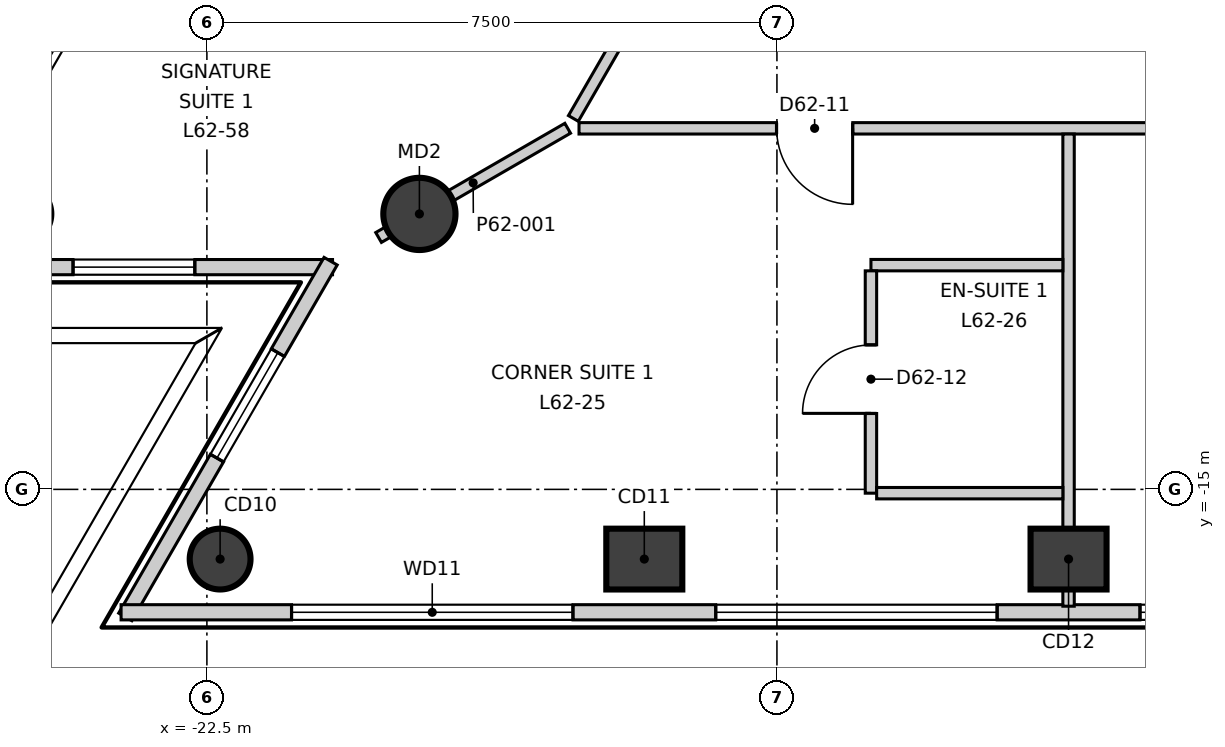
"""IFC4 building model, lengths in metres.
Left out: names, types, materials, properties, quantities, classifications, styles, units other than length and angle.
Written with IfcOpenShell. Run it as: python <this file> out.ifc"""

import sys

from ifc_helpers import new_model, si_unit, direction, frame, frame_2d, origin, origin_2d, place, context, subcontext, project, spatial, rectangle, circle, extrude, element, fill, save


model = new_model("IFC4")
c1 = context("Model", 3, precision=1e-05, world=origin(), true_north=direction((0.0, 1.0)))
c2 = subcontext(c1, "Body", "Model", "MODEL_VIEW")
j1 = project(units=[si_unit("LENGTHUNIT", "METRE"), si_unit("PLANEANGLEUNIT", "RADIAN")], contexts=[c1])
p1 = place(None, origin())
s1 = spatial("IfcSite", under=j1, at=p1, CompositionType="ELEMENT")
p2 = place(p1, origin())
s2 = spatial("IfcBuilding", under=s1, at=p2, CompositionType="ELEMENT")
p3 = place(p2, frame((0.0, 0.0, 268.3)))
s3 = spatial("IfcBuildingStorey", under=s2, at=p3, CompositionType="ELEMENT", Elevation=268.3)
p4 = place(p3, frame((-22.326, -15.917, -0.3), z_axis=(0.0, 0.0, 1.0), x_axis=(1.0, 0.0, 0.0)))
e1 = element("IfcColumn", 1, at=p4, inside=s3, PredefinedType="COLUMN", context=c2, shape_type="SweptSolid", body=[
    extrude(circle(Radius=0.4, at=origin_2d()), origin(), (0.0, 0.0, 1.0), 3.6),
])
for number, where, z_axis, x_axis in (
    (2, (-16.745, -15.917, -0.3), (0.0, 0.0, 1.0), (1.0, 0.0, 0.0)),
    (3, (-11.163, -15.917, -0.3), (0.0, 0.0, 1.0), (1.0, 0.0, 0.0)),
):
    element("IfcColumn", number, at=place(p3, frame(where, z_axis=z_axis, x_axis=x_axis)), inside=s3, PredefinedType="COLUMN", context=c2, shape_type="SweptSolid", body=[
        extrude(rectangle(XDim=1.0, YDim=0.8, at=origin_2d()), origin(), (0.0, 0.0, 1.0), 3.6),
    ])
p5 = place(p3, frame((-19.704, -11.376, -0.3), z_axis=(0.0, 0.0, 1.0), x_axis=(1.0, 0.0, 0.0)))
e4 = element("IfcColumn", 4, at=p5, inside=s3, PredefinedType="COLUMN", context=c2, shape_type="SweptSolid", body=[
    extrude(circle(Radius=0.475, at=origin_2d()), origin(), (0.0, 0.0, 1.0), 3.6),
])
p6 = place(p3, frame((-2.577, 28.771, 0.0), z_axis=(0.0, 0.0, 1.0), x_axis=(-0.49999909388, -0.866025926932, 0.0)))
e5 = element("IfcWall", 5, at=p6, inside=s3, PredefinedType="ELEMENTEDWALL", context=c2, shape_type="SweptSolid", body=[
    extrude(rectangle(XDim=47.236, YDim=0.2, at=frame_2d((23.618, 0.0))), origin(), (0.0, 0.0, 1.0), 3.3),
])
p7 = place(p6, frame((2.243, 0.0, 0.9)))
e6 = element("IfcOpeningElement", 6, at=p7, cuts=e5, PredefinedType="OPENING", context=c2, shape_type="SweptSolid", body=[
    extrude(rectangle(XDim=3.7, YDim=2.2, at=frame_2d((1.85, 1.1))), frame((0.0, 0.11, 0.0), z_axis=(0.0, -1.0, 0.0), x_axis=(1.0, 0.0, 0.0)), (0.0, 0.0, 1.0), 0.22),
])
p8 = place(p6, frame((7.824, 0.0, 0.9)))
e7 = element("IfcOpeningElement", 7, at=p8, cuts=e5, PredefinedType="OPENING", context=c2, shape_type="SweptSolid", body=[
    extrude(rectangle(XDim=3.7, YDim=2.2, at=frame_2d((1.85, 1.1))), frame((0.0, 0.11, 0.0), z_axis=(0.0, -1.0, 0.0), x_axis=(1.0, 0.0, 0.0)), (0.0, 0.0, 1.0), 0.22),
])
p9 = place(p6, frame((13.406, 0.0, 0.9)))
e8 = element("IfcOpeningElement", 8, at=p9, cuts=e5, PredefinedType="OPENING", context=c2, shape_type="SweptSolid", body=[
    extrude(rectangle(XDim=3.7, YDim=2.2, at=frame_2d((1.85, 1.1))), frame((0.0, 0.11, 0.0), z_axis=(0.0, -1.0, 0.0), x_axis=(1.0, 0.0, 0.0)), (0.0, 0.0, 1.0), 0.22),
])
p10 = place(p6, frame((18.987, 0.0, 0.9)))
e9 = element("IfcOpeningElement", 9, at=p10, cuts=e5, PredefinedType="OPENING", context=c2, shape_type="SweptSolid", body=[
    extrude(rectangle(XDim=3.7, YDim=2.2, at=frame_2d((1.85, 1.1))), frame((0.0, 0.11, 0.0), z_axis=(0.0, -1.0, 0.0), x_axis=(1.0, 0.0, 0.0)), (0.0, 0.0, 1.0), 0.22),
])
p11 = place(p6, frame((24.569, 0.0, 0.9)))
e10 = element("IfcOpeningElement", 10, at=p11, cuts=e5, PredefinedType="OPENING", context=c2, shape_type="SweptSolid", body=[
    extrude(rectangle(XDim=3.7, YDim=2.2, at=frame_2d((1.85, 1.1))), frame((0.0, 0.11, 0.0), z_axis=(0.0, -1.0, 0.0), x_axis=(1.0, 0.0, 0.0)), (0.0, 0.0, 1.0), 0.22),
])
p12 = place(p6, frame((30.15, 0.0, 0.9)))
e11 = element("IfcOpeningElement", 11, at=p12, cuts=e5, PredefinedType="OPENING", context=c2, shape_type="SweptSolid", body=[
    extrude(rectangle(XDim=3.7, YDim=2.2, at=frame_2d((1.85, 1.1))), frame((0.0, 0.11, 0.0), z_axis=(0.0, -1.0, 0.0), x_axis=(1.0, 0.0, 0.0)), (0.0, 0.0, 1.0), 0.22),
])
p13 = place(p6, frame((35.731, 0.0, 0.9)))
e12 = element("IfcOpeningElement", 12, at=p13, cuts=e5, PredefinedType="OPENING", context=c2, shape_type="SweptSolid", body=[
    extrude(rectangle(XDim=3.7, YDim=2.2, at=frame_2d((1.85, 1.1))), frame((0.0, 0.11, 0.0), z_axis=(0.0, -1.0, 0.0), x_axis=(1.0, 0.0, 0.0)), (0.0, 0.0, 1.0), 0.22),
])
p14 = place(p6, frame((41.313, 0.0, 0.9)))
e13 = element("IfcOpeningElement", 13, at=p14, cuts=e5, PredefinedType="OPENING", context=c2, shape_type="SweptSolid", body=[
    extrude(rectangle(XDim=3.7, YDim=2.2, at=frame_2d((1.85, 1.1))), frame((0.0, 0.11, 0.0), z_axis=(0.0, -1.0, 0.0), x_axis=(1.0, 0.0, 0.0)), (0.0, 0.0, 1.0), 0.22),
])
p15 = place(p3, frame((-26.25, -12.076, 0.0), z_axis=(0.0, 0.0, 1.0), x_axis=(1.0, 0.0, 0.0)))
e14 = element("IfcWall", 14, at=p15, inside=s3, PredefinedType="ELEMENTEDWALL", context=c2, shape_type="SweptSolid", body=[
    extrude(rectangle(XDim=5.403, YDim=0.2, at=frame_2d((2.702, 0.0))), origin(), (0.0, 0.0, 1.0), 3.3),
])
p16 = place(p15, frame((1.99, 0.0, 0.9)))
e15 = element("IfcOpeningElement", 15, at=p16, cuts=e14, PredefinedType="OPENING", context=c2, shape_type="SweptSolid", body=[
    extrude(rectangle(XDim=1.6, YDim=2.2, at=frame_2d((0.8, 1.1))), frame((0.0, 0.11, 0.0), z_axis=(0.0, -1.0, 0.0), x_axis=(1.0, 0.0, 0.0)), (0.0, 0.0, 1.0), 0.22),
])
p17 = place(p3, frame((-20.872, -11.998, 0.0), z_axis=(0.0, 0.0, 1.0), x_axis=(-0.499992297805, -0.866029850603, 0.0)))
e16 = element("IfcWall", 16, at=p17, inside=s3, PredefinedType="ELEMENTEDWALL", context=c2, shape_type="SweptSolid", body=[
    extrude(rectangle(XDim=5.404, YDim=0.2, at=frame_2d((2.702, 0.0))), origin(), (0.0, 0.0, 1.0), 3.3),
])
p18 = place(p17, frame((1.39, 0.0, 0.9)))
e17 = element("IfcOpeningElement", 17, at=p18, cuts=e16, PredefinedType="OPENING", context=c2, shape_type="SweptSolid", body=[
    extrude(rectangle(XDim=1.6, YDim=2.2, at=frame_2d((0.8, 1.1))), frame((0.0, 0.11, 0.0), z_axis=(0.0, -1.0, 0.0), x_axis=(1.0, 0.0, 0.0)), (0.0, 0.0, 1.0), 0.22),
])
p19 = place(p3, frame((-23.629, -16.617, 0.0), z_axis=(0.0, 0.0, 1.0), x_axis=(1.0, 0.0, 0.0)))
e18 = element("IfcWall", 18, at=p19, inside=s3, PredefinedType="ELEMENTEDWALL", context=c2, shape_type="SweptSolid", body=[
    extrude(rectangle(XDim=47.238, YDim=0.2, at=frame_2d((23.619, 0.0))), origin(), (0.0, 0.0, 1.0), 3.3),
])
p20 = place(p19, frame((2.244, 0.0, 0.9)))
e19 = element("IfcOpeningElement", 19, at=p20, cuts=e18, PredefinedType="OPENING", context=c2, shape_type="SweptSolid", body=[
    extrude(rectangle(XDim=3.7, YDim=2.2, at=frame_2d((1.85, 1.1))), frame((0.0, 0.11, 0.0), z_axis=(0.0, -1.0, 0.0), x_axis=(1.0, 0.0, 0.0)), (0.0, 0.0, 1.0), 0.22),
])
p21 = place(p19, frame((7.825, 0.0, 0.9)))
e20 = element("IfcOpeningElement", 20, at=p21, cuts=e18, PredefinedType="OPENING", context=c2, shape_type="SweptSolid", body=[
    extrude(rectangle(XDim=3.7, YDim=2.2, at=frame_2d((1.85, 1.1))), frame((0.0, 0.11, 0.0), z_axis=(0.0, -1.0, 0.0), x_axis=(1.0, 0.0, 0.0)), (0.0, 0.0, 1.0), 0.22),
])
p22 = place(p19, frame((13.407, 0.0, 0.9)))
e21 = element("IfcOpeningElement", 21, at=p22, cuts=e18, PredefinedType="OPENING", context=c2, shape_type="SweptSolid", body=[
    extrude(rectangle(XDim=3.7, YDim=2.2, at=frame_2d((1.85, 1.1))), frame((0.0, 0.11, 0.0), z_axis=(0.0, -1.0, 0.0), x_axis=(1.0, 0.0, 0.0)), (0.0, 0.0, 1.0), 0.22),
])
p23 = place(p19, frame((18.988, 0.0, 0.9)))
e22 = element("IfcOpeningElement", 22, at=p23, cuts=e18, PredefinedType="OPENING", context=c2, shape_type="SweptSolid", body=[
    extrude(rectangle(XDim=3.7, YDim=2.2, at=frame_2d((1.85, 1.1))), frame((0.0, 0.11, 0.0), z_axis=(0.0, -1.0, 0.0), x_axis=(1.0, 0.0, 0.0)), (0.0, 0.0, 1.0), 0.22),
])
p24 = place(p19, frame((24.57, 0.0, 0.9)))
e23 = element("IfcOpeningElement", 23, at=p24, cuts=e18, PredefinedType="OPENING", context=c2, shape_type="SweptSolid", body=[
    extrude(rectangle(XDim=3.7, YDim=2.2, at=frame_2d((1.85, 1.1))), frame((0.0, 0.11, 0.0), z_axis=(0.0, -1.0, 0.0), x_axis=(1.0, 0.0, 0.0)), (0.0, 0.0, 1.0), 0.22),
])
p25 = place(p19, frame((30.151, 0.0, 0.9)))
e24 = element("IfcOpeningElement", 24, at=p25, cuts=e18, PredefinedType="OPENING", context=c2, shape_type="SweptSolid", body=[
    extrude(rectangle(XDim=3.7, YDim=2.2, at=frame_2d((1.85, 1.1))), frame((0.0, 0.11, 0.0), z_axis=(0.0, -1.0, 0.0), x_axis=(1.0, 0.0, 0.0)), (0.0, 0.0, 1.0), 0.22),
])
p26 = place(p19, frame((35.733, 0.0, 0.9)))
e25 = element("IfcOpeningElement", 25, at=p26, cuts=e18, PredefinedType="OPENING", context=c2, shape_type="SweptSolid", body=[
    extrude(rectangle(XDim=3.7, YDim=2.2, at=frame_2d((1.85, 1.1))), frame((0.0, 0.11, 0.0), z_axis=(0.0, -1.0, 0.0), x_axis=(1.0, 0.0, 0.0)), (0.0, 0.0, 1.0), 0.22),
])
p27 = place(p19, frame((41.314, 0.0, 0.9)))
e26 = element("IfcOpeningElement", 26, at=p27, cuts=e18, PredefinedType="OPENING", context=c2, shape_type="SweptSolid", body=[
    extrude(rectangle(XDim=3.7, YDim=2.2, at=frame_2d((1.85, 1.1))), frame((0.0, 0.11, 0.0), z_axis=(0.0, -1.0, 0.0), x_axis=(1.0, 0.0, 0.0)), (0.0, 0.0, 1.0), 0.22),
])
p28 = place(p3, frame((-20.241, -11.686, 0.0), z_axis=(0.0, 0.0, 1.0), x_axis=(0.86594358484, 0.5001416878, 0.0)))
e27 = element("IfcWall", 27, at=p28, inside=s3, PredefinedType="PARTITIONING", context=c2, shape_type="SweptSolid", body=[
    extrude(rectangle(XDim=2.873, YDim=0.15, at=frame_2d((1.437, 0.0))), origin(), (0.0, 0.0, 1.0), 2.8),
])
p29 = place(p3, frame((-17.678, -10.12, 0.0), z_axis=(0.0, 0.0, 1.0), x_axis=(0.49998824015, 0.86603219323, 0.0)))
e28 = element("IfcWall", 28, at=p29, inside=s3, PredefinedType="PARTITIONING", context=c2, shape_type="SweptSolid", body=[
    extrude(rectangle(XDim=35.357, YDim=0.15, at=frame_2d((17.678, 0.0))), origin(), (0.0, 0.0, 1.0), 3.3),
])
p30 = place(p29, frame((31.607, 0.0, 0.0)))
e29 = element("IfcOpeningElement", 29, at=p30, cuts=e28, PredefinedType="OPENING", context=c2, shape_type="SweptSolid", body=[
    extrude(rectangle(XDim=1.0, YDim=2.1, at=frame_2d((0.5, 1.05))), frame((0.0, 0.085, 0.0), z_axis=(0.0, -1.0, 0.0), x_axis=(1.0, 0.0, 0.0)), (0.0, 0.0, 1.0), 0.17),
])
p31 = place(p29, frame((19.416, 0.0, 0.0)))
e30 = element("IfcOpeningElement", 30, at=p31, cuts=e28, PredefinedType="OPENING", context=c2, shape_type="SweptSolid", body=[
    extrude(rectangle(XDim=1.0, YDim=2.1, at=frame_2d((0.5, 1.05))), frame((0.0, 0.085, 0.0), z_axis=(0.0, -1.0, 0.0), x_axis=(1.0, 0.0, 0.0)), (0.0, 0.0, 1.0), 0.17),
])
p32 = place(p29, frame((24.916, 0.0, 0.0)))
e31 = element("IfcOpeningElement", 31, at=p32, cuts=e28, PredefinedType="OPENING", context=c2, shape_type="SweptSolid", body=[
    extrude(rectangle(XDim=0.9, YDim=2.1, at=frame_2d((0.45, 1.05))), frame((0.0, 0.085, 0.0), z_axis=(0.0, -1.0, 0.0), x_axis=(1.0, 0.0, 0.0)), (0.0, 0.0, 1.0), 0.17),
])
p33 = place(p29, frame((22.816, 0.0, 0.0)))
e32 = element("IfcOpeningElement", 32, at=p33, cuts=e28, PredefinedType="OPENING", context=c2, shape_type="SweptSolid", body=[
    extrude(rectangle(XDim=0.9, YDim=2.1, at=frame_2d((0.45, 1.05))), frame((0.0, 0.085, 0.0), z_axis=(0.0, -1.0, 0.0), x_axis=(1.0, 0.0, 0.0)), (0.0, 0.0, 1.0), 0.17),
])
p34 = place(p29, frame((14.654, 0.0, 0.0)))
e33 = element("IfcOpeningElement", 33, at=p34, cuts=e28, PredefinedType="OPENING", context=c2, shape_type="SweptSolid", body=[
    extrude(rectangle(XDim=1.0, YDim=2.1, at=frame_2d((0.5, 1.05))), frame((0.0, 0.085, 0.0), z_axis=(0.0, -1.0, 0.0), x_axis=(1.0, 0.0, 0.0)), (0.0, 0.0, 1.0), 0.17),
])
p35 = place(p29, frame((7.672, 0.0, 0.0)))
e34 = element("IfcOpeningElement", 34, at=p35, cuts=e28, PredefinedType="OPENING", context=c2, shape_type="SweptSolid", body=[
    extrude(rectangle(XDim=1.0, YDim=2.1, at=frame_2d((0.5, 1.05))), frame((0.0, 0.085, 0.0), z_axis=(0.0, -1.0, 0.0), x_axis=(1.0, 0.0, 0.0)), (0.0, 0.0, 1.0), 0.17),
])
p36 = place(p29, frame((2.69, 0.0, 0.0)))
e35 = element("IfcOpeningElement", 35, at=p36, cuts=e28, PredefinedType="OPENING", context=c2, shape_type="SweptSolid", body=[
    extrude(rectangle(XDim=1.0, YDim=2.1, at=frame_2d((0.5, 1.05))), frame((0.0, 0.085, 0.0), z_axis=(0.0, -1.0, 0.0), x_axis=(1.0, 0.0, 0.0)), (0.0, 0.0, 1.0), 0.17),
])
p37 = place(p3, frame((-17.604, -10.25, 0.0), z_axis=(0.0, 0.0, 1.0), x_axis=(1.0, 0.0, 0.0)))
e36 = element("IfcWall", 36, at=p37, inside=s3, PredefinedType="PARTITIONING", context=c2, shape_type="SweptSolid", body=[
    extrude(rectangle(XDim=35.358, YDim=0.15, at=frame_2d((17.679, 0.0))), origin(), (0.0, 0.0, 1.0), 3.3),
])
p38 = place(p37, frame((2.6, 0.0, 0.0)))
e37 = element("IfcOpeningElement", 37, at=p38, cuts=e36, PredefinedType="OPENING", context=c2, shape_type="SweptSolid", body=[
    extrude(rectangle(XDim=1.0, YDim=2.1, at=frame_2d((0.5, 1.05))), frame((0.0, 0.085, 0.0), z_axis=(0.0, -1.0, 0.0), x_axis=(1.0, 0.0, 0.0)), (0.0, 0.0, 1.0), 0.17),
])
p39 = place(p37, frame((8.391, 0.0, 0.0)))
e38 = element("IfcOpeningElement", 38, at=p39, cuts=e36, PredefinedType="OPENING", context=c2, shape_type="SweptSolid", body=[
    extrude(rectangle(XDim=1.0, YDim=2.1, at=frame_2d((0.5, 1.05))), frame((0.0, 0.085, 0.0), z_axis=(0.0, -1.0, 0.0), x_axis=(1.0, 0.0, 0.0)), (0.0, 0.0, 1.0), 0.17),
])
p40 = place(p37, frame((20.473, 0.0, 0.0)))
e39 = element("IfcOpeningElement", 39, at=p40, cuts=e36, PredefinedType="OPENING", context=c2, shape_type="SweptSolid", body=[
    extrude(rectangle(XDim=1.0, YDim=2.1, at=frame_2d((0.5, 1.05))), frame((0.0, 0.085, 0.0), z_axis=(0.0, -1.0, 0.0), x_axis=(1.0, 0.0, 0.0)), (0.0, 0.0, 1.0), 0.17),
])
p41 = place(p37, frame((14.973, 0.0, 0.0)))
e40 = element("IfcOpeningElement", 40, at=p41, cuts=e36, PredefinedType="OPENING", context=c2, shape_type="SweptSolid", body=[
    extrude(rectangle(XDim=0.9, YDim=2.1, at=frame_2d((0.45, 1.05))), frame((0.0, 0.085, 0.0), z_axis=(0.0, -1.0, 0.0), x_axis=(1.0, 0.0, 0.0)), (0.0, 0.0, 1.0), 0.17),
])
p42 = place(p37, frame((17.173, 0.0, 0.0)))
e41 = element("IfcOpeningElement", 41, at=p42, cuts=e36, PredefinedType="OPENING", context=c2, shape_type="SweptSolid", body=[
    extrude(rectangle(XDim=0.9, YDim=2.1, at=frame_2d((0.45, 1.05))), frame((0.0, 0.085, 0.0), z_axis=(0.0, -1.0, 0.0), x_axis=(1.0, 0.0, 0.0)), (0.0, 0.0, 1.0), 0.17),
])
p43 = place(p37, frame((28.735, 0.0, 0.0)))
e42 = element("IfcOpeningElement", 42, at=p43, cuts=e36, PredefinedType="OPENING", context=c2, shape_type="SweptSolid", body=[
    extrude(rectangle(XDim=1.0, YDim=2.1, at=frame_2d((0.5, 1.05))), frame((0.0, 0.085, 0.0), z_axis=(0.0, -1.0, 0.0), x_axis=(1.0, 0.0, 0.0)), (0.0, 0.0, 1.0), 0.17),
])
p44 = place(p3, frame((-11.163, -16.537, 0.0), z_axis=(0.0, 0.0, 1.0), x_axis=(0.0, 1.0, 0.0)))
e43 = element("IfcWall", 43, at=p44, inside=s3, PredefinedType="PARTITIONING", context=c2, shape_type="SweptSolid", body=[
    extrude(rectangle(XDim=6.212, YDim=0.15, at=frame_2d((3.106, 0.0))), origin(), (0.0, 0.0, 1.0), 3.3),
])
p45 = place(p3, frame((-13.763, -12.05, 0.0), z_axis=(0.0, 0.0, 1.0), x_axis=(1.0, 0.0, 0.0)))
e44 = element("IfcWall", 44, at=p45, inside=s3, PredefinedType="PARTITIONING", context=c2, shape_type="SweptSolid", body=[
    extrude(rectangle(XDim=2.525, YDim=0.15, at=frame_2d((1.262, 0.0))), origin(), (0.0, 0.0, 1.0), 3.3),
])
p46 = place(p3, frame((-13.763, -15.05, 0.0), z_axis=(0.0, 0.0, 1.0), x_axis=(0.0, 1.0, 0.0)))
e45 = element("IfcWall", 45, at=p46, inside=s3, PredefinedType="PARTITIONING", context=c2, shape_type="SweptSolid", body=[
    extrude(rectangle(XDim=2.925, YDim=0.15, at=frame_2d((1.462, 0.0))), origin(), (0.0, 0.0, 1.0), 3.3),
])
p47 = place(p46, frame((1.05, 0.0, 0.0)))
e46 = element("IfcOpeningElement", 46, at=p47, cuts=e45, PredefinedType="OPENING", context=c2, shape_type="SweptSolid", body=[
    extrude(rectangle(XDim=0.9, YDim=2.1, at=frame_2d((0.45, 1.05))), frame((0.0, 0.085, 0.0), z_axis=(0.0, -1.0, 0.0), x_axis=(1.0, 0.0, 0.0)), (0.0, 0.0, 1.0), 0.17),
])
p48 = place(p3, frame((-13.688, -15.05, 0.0), z_axis=(0.0, 0.0, 1.0), x_axis=(1.0, 0.0, 0.0)))
e47 = element("IfcWall", 47, at=p48, inside=s3, PredefinedType="PARTITIONING", context=c2, shape_type="SweptSolid", body=[
    extrude(rectangle(XDim=2.45, YDim=0.15, at=frame_2d((1.225, 0.0))), origin(), (0.0, 0.0, 1.0), 3.3),
])
p49 = place(p14, origin())
e48 = element("IfcWindow", 48, at=p49, inside=s3, PartitioningType="SINGLE_PANEL", PredefinedType="WINDOW", context=c2, shape_type="SweptSolid", body=[
    extrude(rectangle(XDim=3.7, YDim=2.2, at=frame_2d((1.85, 1.1))), frame((0.0, 0.03, 0.0), z_axis=(0.0, -1.0, 0.0), x_axis=(1.0, 0.0, 0.0)), (0.0, 0.0, 1.0), 0.06),
])
fill(e13, e48)
p50 = place(p16, origin())
e49 = element("IfcWindow", 49, at=p50, inside=s3, PartitioningType="SINGLE_PANEL", PredefinedType="WINDOW", context=c2, shape_type="SweptSolid", body=[
    extrude(rectangle(XDim=1.6, YDim=2.2, at=frame_2d((0.8, 1.1))), frame((0.0, 0.03, 0.0), z_axis=(0.0, -1.0, 0.0), x_axis=(1.0, 0.0, 0.0)), (0.0, 0.0, 1.0), 0.06),
])
fill(e15, e49)
p51 = place(p18, origin())
e50 = element("IfcWindow", 50, at=p51, inside=s3, PartitioningType="SINGLE_PANEL", PredefinedType="WINDOW", context=c2, shape_type="SweptSolid", body=[
    extrude(rectangle(XDim=1.6, YDim=2.2, at=frame_2d((0.8, 1.1))), frame((0.0, 0.03, 0.0), z_axis=(0.0, -1.0, 0.0), x_axis=(1.0, 0.0, 0.0)), (0.0, 0.0, 1.0), 0.06),
])
fill(e17, e50)
p52 = place(p20, origin())
e51 = element("IfcWindow", 51, at=p52, inside=s3, PartitioningType="SINGLE_PANEL", PredefinedType="WINDOW", context=c2, shape_type="SweptSolid", body=[
    extrude(rectangle(XDim=3.7, YDim=2.2, at=frame_2d((1.85, 1.1))), frame((0.0, 0.03, 0.0), z_axis=(0.0, -1.0, 0.0), x_axis=(1.0, 0.0, 0.0)), (0.0, 0.0, 1.0), 0.06),
])
fill(e19, e51)
p53 = place(p21, origin())
e52 = element("IfcWindow", 52, at=p53, inside=s3, PartitioningType="SINGLE_PANEL", PredefinedType="WINDOW", context=c2, shape_type="SweptSolid", body=[
    extrude(rectangle(XDim=3.7, YDim=2.2, at=frame_2d((1.85, 1.1))), frame((0.0, 0.03, 0.0), z_axis=(0.0, -1.0, 0.0), x_axis=(1.0, 0.0, 0.0)), (0.0, 0.0, 1.0), 0.06),
])
fill(e20, e52)
p54 = place(p22, origin())
e53 = element("IfcWindow", 53, at=p54, inside=s3, PartitioningType="SINGLE_PANEL", PredefinedType="WINDOW", context=c2, shape_type="SweptSolid", body=[
    extrude(rectangle(XDim=3.7, YDim=2.2, at=frame_2d((1.85, 1.1))), frame((0.0, 0.03, 0.0), z_axis=(0.0, -1.0, 0.0), x_axis=(1.0, 0.0, 0.0)), (0.0, 0.0, 1.0), 0.06),
])
fill(e21, e53)
p55 = place(p38, origin())
e54 = element("IfcDoor", 54, at=p55, inside=s3, OperationType="SINGLE_SWING_RIGHT", PredefinedType="DOOR", context=c2, shape_type="SweptSolid", body=[
    extrude(rectangle(XDim=1.0, YDim=2.1, at=frame_2d((0.5, 1.05))), frame((0.0, 0.025, 0.0), z_axis=(0.0, -1.0, 0.0), x_axis=(1.0, 0.0, 0.0)), (0.0, 0.0, 1.0), 0.05),
])
fill(e37, e54)
p56 = place(p47, origin())
e55 = element("IfcDoor", 55, at=p56, inside=s3, OperationType="SINGLE_SWING_RIGHT", PredefinedType="DOOR", context=c2, shape_type="SweptSolid", body=[
    extrude(rectangle(XDim=0.9, YDim=2.1, at=frame_2d((0.45, 1.05))), frame((0.0, 0.025, 0.0), z_axis=(0.0, -1.0, 0.0), x_axis=(1.0, 0.0, 0.0)), (0.0, 0.0, 1.0), 0.05),
])
fill(e46, e55)
save(model, sys.argv[1])
